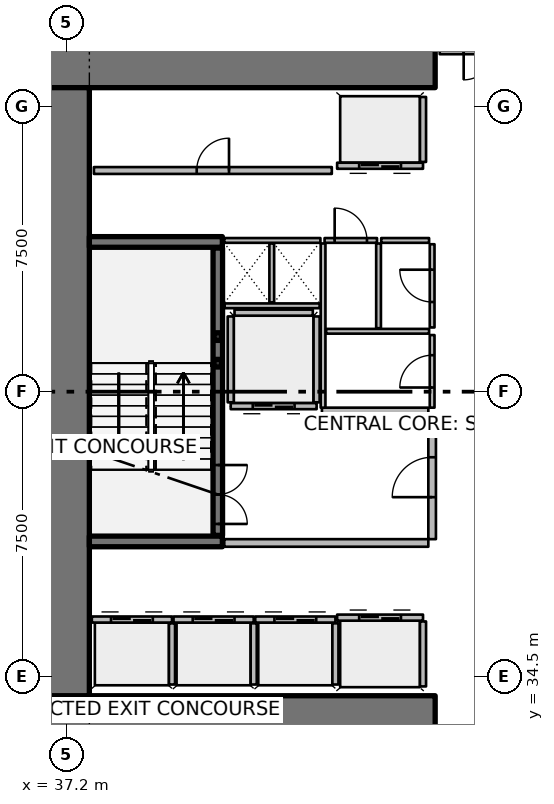
"""IFC4 building model, lengths in metres.
Left out: names, types, materials, properties, quantities, classifications, styles, units other than length and angle.
Written with IfcOpenShell. Run it as: python <this file> out.ifc"""

import sys

from ifc_helpers import new_model, si_unit, direction, frame, frame_2d, origin, origin_2d, place, context, subcontext, project, spatial, rectangle, hollow_rectangle, extrude, element, fill, save


model = new_model("IFC4")
c1 = context("Model", 3, precision=1e-05, world=origin(), true_north=direction((0.0, 1.0)))
c2 = subcontext(c1, "Body", "Model", "MODEL_VIEW")
j1 = project(units=[si_unit("LENGTHUNIT", "METRE"), si_unit("PLANEANGLEUNIT", "RADIAN")], contexts=[c1])
p1 = place(None, origin())
s1 = spatial("IfcSite", under=j1, at=p1, CompositionType="ELEMENT")
p2 = place(p1, origin())
s2 = spatial("IfcBuilding", under=s1, at=p2, CompositionType="ELEMENT")
p3 = place(p2, origin())
s3 = spatial("IfcBuildingStorey", under=s2, at=p3, CompositionType="ELEMENT", Elevation=0.0)
for number, where, z_axis, x_axis in (
    (1, (36.7, 33.45, 0.0), (0.0, 0.0, 1.0), (1.0, 0.0, 0.0)),
    (2, (36.7, 50.55, 0.0), (0.0, 0.0, 1.0), (1.0, 0.0, 0.0)),
):
    element("IfcWall", number, at=place(p3, frame(where, z_axis=z_axis, x_axis=x_axis)), inside=s3, PredefinedType="SHEAR", context=c2, shape_type="SweptSolid", body=[
        extrude(rectangle(XDim=10.2, YDim=1.1, at=frame_2d((5.1, 0.0))), origin(), (0.0, 0.0, 1.0), 7.2),
    ])
p4 = place(p3, frame((37.25, 34.0, 0.0), z_axis=(0.0, 0.0, 1.0), x_axis=(0.0, 1.0, 0.0)))
e3 = element("IfcWall", 3, at=p4, inside=s3, PredefinedType="SHEAR", context=c2, shape_type="SweptSolid", body=[
    extrude(rectangle(XDim=16.0, YDim=1.1, at=frame_2d((8.0, 0.0))), origin(), (0.0, 0.0, 1.0), 7.2),
])
for number, where, z_axis, x_axis in (
    (4, (37.8, 38.06, 0.0), (0.0, 0.0, 1.0), (1.0, 0.0, 0.0)),
    (5, (37.8, 45.94, 0.0), (0.0, 0.0, 1.0), (1.0, 0.0, 0.0)),
):
    element("IfcWall", number, at=place(p3, frame(where, z_axis=z_axis, x_axis=x_axis)), inside=s3, PredefinedType="SHEAR", context=c2, shape_type="SweptSolid", body=[
        extrude(rectangle(XDim=3.5, YDim=0.28, at=frame_2d((1.75, 0.0))), origin(), (0.0, 0.0, 1.0), 7.2),
    ])
p5 = place(p3, frame((41.18, 42.75, 0.0), z_axis=(0.0, 0.0, 1.0), x_axis=(1.0, 0.0, 0.0)))
e6 = element("IfcColumn", 6, at=p5, inside=s3, PredefinedType="COLUMN", context=c2, shape_type="SweptSolid", body=[
    extrude(hollow_rectangle(XDim=0.2, YDim=0.2, WallThickness=0.01, InnerFilletRadius=0.01, OuterFilletRadius=0.02, at=origin_2d()), origin(), (0.0, 0.0, 1.0), 1.595),
])
p6 = place(p3, frame((41.18, 43.45, 0.0), z_axis=(0.0, 0.0, 1.0), x_axis=(1.0, 0.0, 0.0)))
e7 = element("IfcColumn", 7, at=p6, inside=s3, PredefinedType="COLUMN", context=c2, shape_type="SweptSolid", body=[
    extrude(hollow_rectangle(XDim=0.2, YDim=0.2, WallThickness=0.01, InnerFilletRadius=0.01, OuterFilletRadius=0.02, at=origin_2d()), origin(), (0.0, 0.0, 1.0), 5.195),
])
p7 = place(p3, frame((41.18, 38.22, 0.0), z_axis=(0.0, 0.0, 1.0), x_axis=(0.0, 1.0, 0.0)))
e8 = element("IfcWall", 8, at=p7, inside=s3, PredefinedType="SOLIDWALL", context=c2, shape_type="SweptSolid", body=[
    extrude(rectangle(XDim=7.56, YDim=0.25, at=frame_2d((3.78, 0.0))), origin(), (0.0, 0.0, 1.0), 6.8),
])
p8 = place(p7, frame((0.3, 0.0, 0.0)))
e9 = element("IfcOpeningElement", 9, at=p8, cuts=e8, PredefinedType="OPENING", context=c2, shape_type="SweptSolid", body=[
    extrude(rectangle(XDim=1.55, YDim=2.15, at=frame_2d((0.775, 1.075))), frame((0.0, 0.135, 0.0), z_axis=(0.0, -1.0, 0.0), x_axis=(1.0, 0.0, 0.0)), (0.0, 0.0, 1.0), 0.27),
])
p9 = place(p3, frame((37.865, 36.005, 0.0), z_axis=(0.0, 0.0, 1.0), x_axis=(1.0, 0.0, 0.0)))
e10 = element("IfcWall", 10, at=p9, inside=s3, PredefinedType="PARTITIONING", context=c2, shape_type="SweptSolid", body=[
    extrude(rectangle(XDim=2.11, YDim=0.16, at=frame_2d((1.055, 0.0))), origin(), (0.0, 0.0, 1.0), 6.8),
])
p10 = place(p9, frame((0.505, 0.0, 0.0)))
e11 = element("IfcOpeningElement", 11, at=p10, cuts=e10, PredefinedType="OPENING", context=c2, shape_type="SweptSolid", body=[
    extrude(rectangle(XDim=1.1, YDim=2.1, at=frame_2d((0.55, 1.05))), frame((0.0, 0.09, 0.0), z_axis=(0.0, -1.0, 0.0), x_axis=(1.0, 0.0, 0.0)), (0.0, 0.0, 1.0), 0.18),
])
p11 = place(p3, frame((39.975, 34.295, 0.0), z_axis=(0.0, 0.0, 1.0), x_axis=(0.0, 1.0, 0.0)))
e12 = element("IfcWall", 12, at=p11, inside=s3, PredefinedType="PARTITIONING", context=c2, shape_type="SweptSolid", body=[
    extrude(rectangle(XDim=1.61, YDim=0.16, at=frame_2d((0.805, 0.0))), origin(), (0.0, 0.0, 1.0), 6.8),
])
p12 = place(p3, frame((40.015, 36.005, 0.0), z_axis=(0.0, 0.0, 1.0), x_axis=(1.0, 0.0, 0.0)))
e13 = element("IfcWall", 13, at=p12, inside=s3, PredefinedType="PARTITIONING", context=c2, shape_type="SweptSolid", body=[
    extrude(rectangle(XDim=2.11, YDim=0.16, at=frame_2d((1.055, 0.0))), origin(), (0.0, 0.0, 1.0), 6.8),
])
p13 = place(p12, frame((0.505, 0.0, 0.0)))
e14 = element("IfcOpeningElement", 14, at=p13, cuts=e13, PredefinedType="OPENING", context=c2, shape_type="SweptSolid", body=[
    extrude(rectangle(XDim=1.1, YDim=2.1, at=frame_2d((0.55, 1.05))), frame((0.0, 0.09, 0.0), z_axis=(0.0, -1.0, 0.0), x_axis=(1.0, 0.0, 0.0)), (0.0, 0.0, 1.0), 0.18),
])
p14 = place(p3, frame((42.125, 34.295, 0.0), z_axis=(0.0, 0.0, 1.0), x_axis=(0.0, 1.0, 0.0)))
e15 = element("IfcWall", 15, at=p14, inside=s3, PredefinedType="PARTITIONING", context=c2, shape_type="SweptSolid", body=[
    extrude(rectangle(XDim=1.61, YDim=0.16, at=frame_2d((0.805, 0.0))), origin(), (0.0, 0.0, 1.0), 6.8),
])
p15 = place(p3, frame((42.165, 36.005, 0.0), z_axis=(0.0, 0.0, 1.0), x_axis=(1.0, 0.0, 0.0)))
e16 = element("IfcWall", 16, at=p15, inside=s3, PredefinedType="PARTITIONING", context=c2, shape_type="SweptSolid", body=[
    extrude(rectangle(XDim=2.11, YDim=0.16, at=frame_2d((1.055, 0.0))), origin(), (0.0, 0.0, 1.0), 6.8),
])
p16 = place(p15, frame((0.505, 0.0, 0.0)))
e17 = element("IfcOpeningElement", 17, at=p16, cuts=e16, PredefinedType="OPENING", context=c2, shape_type="SweptSolid", body=[
    extrude(rectangle(XDim=1.1, YDim=2.1, at=frame_2d((0.55, 1.05))), frame((0.0, 0.09, 0.0), z_axis=(0.0, -1.0, 0.0), x_axis=(1.0, 0.0, 0.0)), (0.0, 0.0, 1.0), 0.18),
])
p17 = place(p3, frame((44.275, 34.295, 0.0), z_axis=(0.0, 0.0, 1.0), x_axis=(0.0, 1.0, 0.0)))
e18 = element("IfcWall", 18, at=p17, inside=s3, PredefinedType="PARTITIONING", context=c2, shape_type="SweptSolid", body=[
    extrude(rectangle(XDim=1.61, YDim=0.16, at=frame_2d((0.805, 0.0))), origin(), (0.0, 0.0, 1.0), 6.8),
])
p18 = place(p3, frame((46.58, 47.945, 0.0), z_axis=(0.0, 0.0, 1.0), x_axis=(-1.0, 0.0, 0.0)))
e19 = element("IfcWall", 19, at=p18, inside=s3, PredefinedType="PARTITIONING", context=c2, shape_type="SweptSolid", body=[
    extrude(rectangle(XDim=2.26, YDim=0.16, at=frame_2d((1.13, 0.0))), origin(), (0.0, 0.0, 1.0), 6.8),
])
p19 = place(p18, frame((0.58, 0.0, 0.0)))
e20 = element("IfcOpeningElement", 20, at=p19, cuts=e19, PredefinedType="OPENING", context=c2, shape_type="SweptSolid", body=[
    extrude(rectangle(XDim=1.1, YDim=2.1, at=frame_2d((0.55, 1.05))), frame((0.0, 0.09, 0.0), z_axis=(0.0, -1.0, 0.0), x_axis=(1.0, 0.0, 0.0)), (0.0, 0.0, 1.0), 0.18),
])
p20 = place(p3, frame((46.58, 48.045, 0.0), z_axis=(0.0, 0.0, 1.0), x_axis=(0.0, 1.0, 0.0)))
e21 = element("IfcWall", 21, at=p20, inside=s3, PredefinedType="PARTITIONING", context=c2, shape_type="SweptSolid", body=[
    extrude(rectangle(XDim=1.71, YDim=0.16, at=frame_2d((0.855, 0.0))), origin(), (0.0, 0.0, 1.0), 6.8),
])
p21 = place(p3, frame((44.32, 36.055, 0.0), z_axis=(0.0, 0.0, 1.0), x_axis=(1.0, 0.0, 0.0)))
e22 = element("IfcWall", 22, at=p21, inside=s3, PredefinedType="PARTITIONING", context=c2, shape_type="SweptSolid", body=[
    extrude(rectangle(XDim=2.26, YDim=0.16, at=frame_2d((1.13, 0.0))), origin(), (0.0, 0.0, 1.0), 6.8),
])
p22 = place(p21, frame((0.58, 0.0, 0.0)))
e23 = element("IfcOpeningElement", 23, at=p22, cuts=e22, PredefinedType="OPENING", context=c2, shape_type="SweptSolid", body=[
    extrude(rectangle(XDim=1.1, YDim=2.1, at=frame_2d((0.55, 1.05))), frame((0.0, 0.09, 0.0), z_axis=(0.0, -1.0, 0.0), x_axis=(1.0, 0.0, 0.0)), (0.0, 0.0, 1.0), 0.18),
])
p23 = place(p3, frame((46.58, 34.245, 0.0), z_axis=(0.0, 0.0, 1.0), x_axis=(0.0, 1.0, 0.0)))
e24 = element("IfcWall", 24, at=p23, inside=s3, PredefinedType="PARTITIONING", context=c2, shape_type="SweptSolid", body=[
    extrude(rectangle(XDim=1.71, YDim=0.16, at=frame_2d((0.855, 0.0))), origin(), (0.0, 0.0, 1.0), 6.8),
])
p24 = place(p3, frame((43.78, 41.62, 0.0), z_axis=(0.0, 0.0, 1.0), x_axis=(-1.0, 0.0, 0.0)))
e25 = element("IfcWall", 25, at=p24, inside=s3, PredefinedType="PARTITIONING", context=c2, shape_type="SweptSolid", body=[
    extrude(rectangle(XDim=2.26, YDim=0.16, at=frame_2d((1.13, 0.0))), origin(), (0.0, 0.0, 1.0), 6.8),
])
p25 = place(p24, frame((0.58, 0.0, 0.0)))
e26 = element("IfcOpeningElement", 26, at=p25, cuts=e25, PredefinedType="OPENING", context=c2, shape_type="SweptSolid", body=[
    extrude(rectangle(XDim=1.1, YDim=2.1, at=frame_2d((0.55, 1.05))), frame((0.0, 0.09, 0.0), z_axis=(0.0, -1.0, 0.0), x_axis=(1.0, 0.0, 0.0)), (0.0, 0.0, 1.0), 0.18),
])
for number, where, z_axis, x_axis in (
    (27, (43.78, 41.72, 0.0), (0.0, 0.0, 1.0), (0.0, 1.0, 0.0)),
    (28, (41.52, 41.72, 0.0), (0.0, 0.0, 1.0), (0.0, 1.0, 0.0)),
):
    element("IfcWall", number, at=place(p3, frame(where, z_axis=z_axis, x_axis=x_axis)), inside=s3, PredefinedType="PARTITIONING", context=c2, shape_type="SweptSolid", body=[
        extrude(rectangle(XDim=2.26, YDim=0.16, at=frame_2d((1.13, 0.0))), origin(), (0.0, 0.0, 1.0), 6.8),
    ])
p26 = place(p3, frame((41.62, 44.08, 0.0), z_axis=(0.0, 0.0, 1.0), x_axis=(1.0, 0.0, 0.0)))
e29 = element("IfcWall", 29, at=p26, inside=s3, PredefinedType="PARTITIONING", context=c2, shape_type="SweptSolid", body=[
    extrude(rectangle(XDim=2.06, YDim=0.16, at=frame_2d((1.03, 0.0))), origin(), (0.0, 0.0, 1.0), 6.8),
])
p27 = place(p3, frame((37.92, 47.82, 0.0), z_axis=(0.0, 0.0, 1.0), x_axis=(1.0, 0.0, 0.0)))
e30 = element("IfcWall", 30, at=p27, inside=s3, PredefinedType="PARTITIONING", context=c2, shape_type="SweptSolid", body=[
    extrude(rectangle(XDim=6.26, YDim=0.18, at=frame_2d((3.13, 0.0))), origin(), (0.0, 0.0, 1.0), 6.8),
])
p28 = place(p27, frame((2.705, 0.0, 0.0)))
e31 = element("IfcOpeningElement", 31, at=p28, cuts=e30, PredefinedType="OPENING", context=c2, shape_type="SweptSolid", body=[
    extrude(rectangle(XDim=0.85, YDim=2.06, at=frame_2d((0.425, 1.03))), frame((0.0, 0.1, 0.0), z_axis=(0.0, -1.0, 0.0), x_axis=(1.0, 0.0, 0.0)), (0.0, 0.0, 1.0), 0.2),
])
p29 = place(p3, frame((47.02, 50.98, 0.0), z_axis=(0.0, 0.0, 1.0), x_axis=(1.0, 0.0, 0.0)))
e32 = element("IfcWall", 32, at=p29, inside=s3, PredefinedType="PARTITIONING", context=c2, shape_type="SweptSolid", body=[
    extrude(rectangle(XDim=2.81, YDim=0.2, at=frame_2d((1.405, 0.0))), origin(), (0.0, 0.0, 1.0), 6.8),
])
p30 = place(p29, frame((0.63, 0.0, 0.0)))
e33 = element("IfcOpeningElement", 33, at=p30, cuts=e32, PredefinedType="OPENING", context=c2, shape_type="SweptSolid", body=[
    extrude(rectangle(XDim=1.55, YDim=2.15, at=frame_2d((0.775, 1.075))), frame((0.0, 0.11, 0.0), z_axis=(0.0, -1.0, 0.0), x_axis=(1.0, 0.0, 0.0)), (0.0, 0.0, 1.0), 0.22),
])
p31 = place(p3, frame((41.35, 38.02, 0.0), z_axis=(0.0, 0.0, 1.0), x_axis=(1.0, 0.0, 0.0)))
e34 = element("IfcWall", 34, at=p31, inside=s3, PredefinedType="PARTITIONING", context=c2, shape_type="SweptSolid", body=[
    extrude(rectangle(XDim=5.37, YDim=0.2, at=frame_2d((2.685, 0.0))), origin(), (0.0, 0.0, 1.0), 6.8),
])
p32 = place(p3, frame((43.92, 41.48, 0.0), z_axis=(0.0, 0.0, 1.0), x_axis=(1.0, 0.0, 0.0)))
e35 = element("IfcWall", 35, at=p32, inside=s3, PredefinedType="PARTITIONING", context=c2, shape_type="SweptSolid", body=[
    extrude(rectangle(XDim=2.8, YDim=0.2, at=frame_2d((1.4, 0.0))), origin(), (0.0, 0.0, 1.0), 6.8),
])
p33 = place(p3, frame((46.82, 38.12, 0.0), z_axis=(0.0, 0.0, 1.0), x_axis=(0.0, 1.0, 0.0)))
e36 = element("IfcWall", 36, at=p33, inside=s3, PredefinedType="PARTITIONING", context=c2, shape_type="SweptSolid", body=[
    extrude(rectangle(XDim=3.26, YDim=0.2, at=frame_2d((1.63, 0.0))), origin(), (0.0, 0.0, 1.0), 6.8),
])
p34 = place(p33, frame((1.105, 0.0, 0.0)))
e37 = element("IfcOpeningElement", 37, at=p34, cuts=e36, PredefinedType="OPENING", context=c2, shape_type="SweptSolid", body=[
    extrude(rectangle(XDim=1.05, YDim=2.1, at=frame_2d((0.525, 1.05))), frame((0.0, 0.11, 0.0), z_axis=(0.0, -1.0, 0.0), x_axis=(1.0, 0.0, 0.0)), (0.0, 0.0, 1.0), 0.22),
])
p35 = place(p3, frame((41.36, 44.26, 0.0), z_axis=(0.0, 0.0, 1.0), x_axis=(1.0, 0.0, 0.0)))
e38 = element("IfcWall", 38, at=p35, inside=s3, PredefinedType="PARTITIONING", context=c2, shape_type="SweptSolid", body=[
    extrude(rectangle(XDim=2.5, YDim=0.125, at=frame_2d((1.25, 0.0))), origin(), (0.0, 0.0, 1.0), 6.24),
])
p36 = place(p3, frame((42.6, 44.35, 0.0), z_axis=(0.0, 0.0, 1.0), x_axis=(0.0, 1.0, 0.0)))
e39 = element("IfcWall", 39, at=p36, inside=s3, PredefinedType="PARTITIONING", context=c2, shape_type="SweptSolid", body=[
    extrude(rectangle(XDim=1.55, YDim=0.125, at=frame_2d((0.775, 0.0))), origin(), (0.0, 0.0, 1.0), 6.24),
])
p37 = place(p3, frame((43.95, 41.58, 0.0), z_axis=(0.0, 0.0, 1.0), x_axis=(0.0, 1.0, 0.0)))
e40 = element("IfcWall", 40, at=p37, inside=s3, PredefinedType="PARTITIONING", context=c2, shape_type="SweptSolid", body=[
    extrude(rectangle(XDim=4.32, YDim=0.125, at=frame_2d((2.16, 0.0))), origin(), (0.0, 0.0, 1.0), 6.24),
])
p38 = place(p3, frame((44.03, 43.59, 0.0), z_axis=(0.0, 0.0, 1.0), x_axis=(1.0, 0.0, 0.0)))
e41 = element("IfcWall", 41, at=p38, inside=s3, PredefinedType="PARTITIONING", context=c2, shape_type="SweptSolid", body=[
    extrude(rectangle(XDim=2.71, YDim=0.125, at=frame_2d((1.355, 0.0))), origin(), (0.0, 0.0, 1.0), 6.24),
])
p39 = place(p3, frame((45.41, 43.67, 0.0), z_axis=(0.0, 0.0, 1.0), x_axis=(0.0, 1.0, 0.0)))
e42 = element("IfcWall", 42, at=p39, inside=s3, PredefinedType="PARTITIONING", context=c2, shape_type="SweptSolid", body=[
    extrude(rectangle(XDim=2.23, YDim=0.125, at=frame_2d((1.115, 0.0))), origin(), (0.0, 0.0, 1.0), 6.24),
])
p40 = place(p3, frame((46.82, 41.58, 0.0), z_axis=(0.0, 0.0, 1.0), x_axis=(0.0, 1.0, 0.0)))
e43 = element("IfcWall", 43, at=p40, inside=s3, PredefinedType="PARTITIONING", context=c2, shape_type="SweptSolid", body=[
    extrude(rectangle(XDim=1.91, YDim=0.125, at=frame_2d((0.955, 0.0))), origin(), (0.0, 0.0, 1.0), 6.24),
])
p41 = place(p40, frame((0.53, 0.0, 0.0)))
e44 = element("IfcOpeningElement", 44, at=p41, cuts=e43, PredefinedType="OPENING", context=c2, shape_type="SweptSolid", body=[
    extrude(rectangle(XDim=0.85, YDim=2.06, at=frame_2d((0.425, 1.03))), frame((0.0, 0.073, 0.0), z_axis=(0.0, -1.0, 0.0), x_axis=(1.0, 0.0, 0.0)), (0.0, 0.0, 1.0), 0.145),
])
p42 = place(p3, frame((46.82, 43.69, 0.0), z_axis=(0.0, 0.0, 1.0), x_axis=(0.0, 1.0, 0.0)))
e45 = element("IfcWall", 45, at=p42, inside=s3, PredefinedType="PARTITIONING", context=c2, shape_type="SweptSolid", body=[
    extrude(rectangle(XDim=2.19, YDim=0.125, at=frame_2d((1.095, 0.0))), origin(), (0.0, 0.0, 1.0), 6.24),
])
p43 = place(p42, frame((0.67, 0.0, 0.0)))
e46 = element("IfcOpeningElement", 46, at=p43, cuts=e45, PredefinedType="OPENING", context=c2, shape_type="SweptSolid", body=[
    extrude(rectangle(XDim=0.85, YDim=2.06, at=frame_2d((0.425, 1.03))), frame((0.0, 0.073, 0.0), z_axis=(0.0, -1.0, 0.0), x_axis=(1.0, 0.0, 0.0)), (0.0, 0.0, 1.0), 0.145),
])
p44 = place(p3, frame((41.35, 45.98, 0.0), z_axis=(0.0, 0.0, 1.0), x_axis=(1.0, 0.0, 0.0)))
e47 = element("IfcWall", 47, at=p44, inside=s3, PredefinedType="PARTITIONING", context=c2, shape_type="SweptSolid", body=[
    extrude(rectangle(XDim=2.53, YDim=0.125, at=frame_2d((1.265, 0.0))), origin(), (0.0, 0.0, 1.0), 6.24),
])
p45 = place(p3, frame((43.99, 45.98, 0.0), z_axis=(0.0, 0.0, 1.0), x_axis=(1.0, 0.0, 0.0)))
e48 = element("IfcWall", 48, at=p45, inside=s3, PredefinedType="PARTITIONING", context=c2, shape_type="SweptSolid", body=[
    extrude(rectangle(XDim=1.38, YDim=0.125, at=frame_2d((0.69, 0.0))), origin(), (0.0, 0.0, 1.0), 6.24),
])
p46 = place(p45, frame((0.265, 0.0, 0.0)))
e49 = element("IfcOpeningElement", 49, at=p46, cuts=e48, PredefinedType="OPENING", context=c2, shape_type="SweptSolid", body=[
    extrude(rectangle(XDim=0.85, YDim=2.06, at=frame_2d((0.425, 1.03))), frame((0.0, 0.073, 0.0), z_axis=(0.0, -1.0, 0.0), x_axis=(1.0, 0.0, 0.0)), (0.0, 0.0, 1.0), 0.145),
])
p47 = place(p3, frame((45.48, 45.98, 0.0), z_axis=(0.0, 0.0, 1.0), x_axis=(1.0, 0.0, 0.0)))
e50 = element("IfcWall", 50, at=p47, inside=s3, PredefinedType="PARTITIONING", context=c2, shape_type="SweptSolid", body=[
    extrude(rectangle(XDim=1.26, YDim=0.125, at=frame_2d((0.63, 0.0))), origin(), (0.0, 0.0, 1.0), 6.24),
])
p48 = place(p8, origin())
e51 = element("IfcDoor", 51, at=p48, inside=s3, OperationType="DOUBLE_DOOR_SINGLE_SWING", PredefinedType="DOOR", context=c2, shape_type="SweptSolid", body=[
    extrude(rectangle(XDim=1.55, YDim=2.15, at=frame_2d((0.775, 1.075))), frame((0.0, 0.025, 0.0), z_axis=(0.0, -1.0, 0.0), x_axis=(1.0, 0.0, 0.0)), (0.0, 0.0, 1.0), 0.05),
])
fill(e9, e51)
p49 = place(p10, origin())
e52 = element("IfcDoor", 52, at=p49, inside=s3, OperationType="DOUBLE_DOOR_SLIDING", PredefinedType="DOOR", context=c2, shape_type="SweptSolid", body=[
    extrude(rectangle(XDim=1.1, YDim=2.1, at=frame_2d((0.55, 1.05))), frame((0.0, 0.025, 0.0), z_axis=(0.0, -1.0, 0.0), x_axis=(1.0, 0.0, 0.0)), (0.0, 0.0, 1.0), 0.05),
])
fill(e11, e52)
p50 = place(p13, origin())
e53 = element("IfcDoor", 53, at=p50, inside=s3, OperationType="DOUBLE_DOOR_SLIDING", PredefinedType="DOOR", context=c2, shape_type="SweptSolid", body=[
    extrude(rectangle(XDim=1.1, YDim=2.1, at=frame_2d((0.55, 1.05))), frame((0.0, 0.025, 0.0), z_axis=(0.0, -1.0, 0.0), x_axis=(1.0, 0.0, 0.0)), (0.0, 0.0, 1.0), 0.05),
])
fill(e14, e53)
p51 = place(p16, origin())
e54 = element("IfcDoor", 54, at=p51, inside=s3, OperationType="DOUBLE_DOOR_SLIDING", PredefinedType="DOOR", context=c2, shape_type="SweptSolid", body=[
    extrude(rectangle(XDim=1.1, YDim=2.1, at=frame_2d((0.55, 1.05))), frame((0.0, 0.025, 0.0), z_axis=(0.0, -1.0, 0.0), x_axis=(1.0, 0.0, 0.0)), (0.0, 0.0, 1.0), 0.05),
])
fill(e17, e54)
p52 = place(p19, origin())
e55 = element("IfcDoor", 55, at=p52, inside=s3, OperationType="DOUBLE_DOOR_SLIDING", PredefinedType="DOOR", context=c2, shape_type="SweptSolid", body=[
    extrude(rectangle(XDim=1.1, YDim=2.1, at=frame_2d((0.55, 1.05))), frame((0.0, 0.025, 0.0), z_axis=(0.0, -1.0, 0.0), x_axis=(1.0, 0.0, 0.0)), (0.0, 0.0, 1.0), 0.05),
])
fill(e20, e55)
p53 = place(p22, origin())
e56 = element("IfcDoor", 56, at=p53, inside=s3, OperationType="DOUBLE_DOOR_SLIDING", PredefinedType="DOOR", context=c2, shape_type="SweptSolid", body=[
    extrude(rectangle(XDim=1.1, YDim=2.1, at=frame_2d((0.55, 1.05))), frame((0.0, 0.025, 0.0), z_axis=(0.0, -1.0, 0.0), x_axis=(1.0, 0.0, 0.0)), (0.0, 0.0, 1.0), 0.05),
])
fill(e23, e56)
p54 = place(p25, origin())
e57 = element("IfcDoor", 57, at=p54, inside=s3, OperationType="DOUBLE_DOOR_SLIDING", PredefinedType="DOOR", context=c2, shape_type="SweptSolid", body=[
    extrude(rectangle(XDim=1.1, YDim=2.1, at=frame_2d((0.55, 1.05))), frame((0.0, 0.025, 0.0), z_axis=(0.0, -1.0, 0.0), x_axis=(1.0, 0.0, 0.0)), (0.0, 0.0, 1.0), 0.05),
])
fill(e26, e57)
p55 = place(p28, origin())
e58 = element("IfcDoor", 58, at=p55, inside=s3, OperationType="SINGLE_SWING_RIGHT", PredefinedType="DOOR", context=c2, shape_type="SweptSolid", body=[
    extrude(rectangle(XDim=0.85, YDim=2.06, at=frame_2d((0.425, 1.03))), frame((0.0, 0.025, 0.0), z_axis=(0.0, -1.0, 0.0), x_axis=(1.0, 0.0, 0.0)), (0.0, 0.0, 1.0), 0.05),
])
fill(e31, e58)
p56 = place(p34, origin())
e59 = element("IfcDoor", 59, at=p56, inside=s3, OperationType="SINGLE_SWING_LEFT", PredefinedType="DOOR", context=c2, shape_type="SweptSolid", body=[
    extrude(rectangle(XDim=1.05, YDim=2.1, at=frame_2d((0.525, 1.05))), frame((0.0, 0.025, 0.0), z_axis=(0.0, -1.0, 0.0), x_axis=(1.0, 0.0, 0.0)), (0.0, 0.0, 1.0), 0.05),
])
fill(e37, e59)
p57 = place(p41, origin())
e60 = element("IfcDoor", 60, at=p57, inside=s3, OperationType="SINGLE_SWING_LEFT", PredefinedType="DOOR", context=c2, shape_type="SweptSolid", body=[
    extrude(rectangle(XDim=0.85, YDim=2.06, at=frame_2d((0.425, 1.03))), frame((0.0, 0.025, 0.0), z_axis=(0.0, -1.0, 0.0), x_axis=(1.0, 0.0, 0.0)), (0.0, 0.0, 1.0), 0.05),
])
fill(e44, e60)
p58 = place(p43, origin())
e61 = element("IfcDoor", 61, at=p58, inside=s3, OperationType="SINGLE_SWING_RIGHT", PredefinedType="DOOR", context=c2, shape_type="SweptSolid", body=[
    extrude(rectangle(XDim=0.85, YDim=2.06, at=frame_2d((0.425, 1.03))), frame((0.0, 0.025, 0.0), z_axis=(0.0, -1.0, 0.0), x_axis=(1.0, 0.0, 0.0)), (0.0, 0.0, 1.0), 0.05),
])
fill(e46, e61)
p59 = place(p46, origin())
e62 = element("IfcDoor", 62, at=p59, inside=s3, OperationType="SINGLE_SWING_LEFT", PredefinedType="DOOR", context=c2, shape_type="SweptSolid", body=[
    extrude(rectangle(XDim=0.85, YDim=2.06, at=frame_2d((0.425, 1.03))), frame((0.0, 0.025, 0.0), z_axis=(0.0, -1.0, 0.0), x_axis=(1.0, 0.0, 0.0)), (0.0, 0.0, 1.0), 0.05),
])
fill(e49, e62)
save(model, sys.argv[1])
